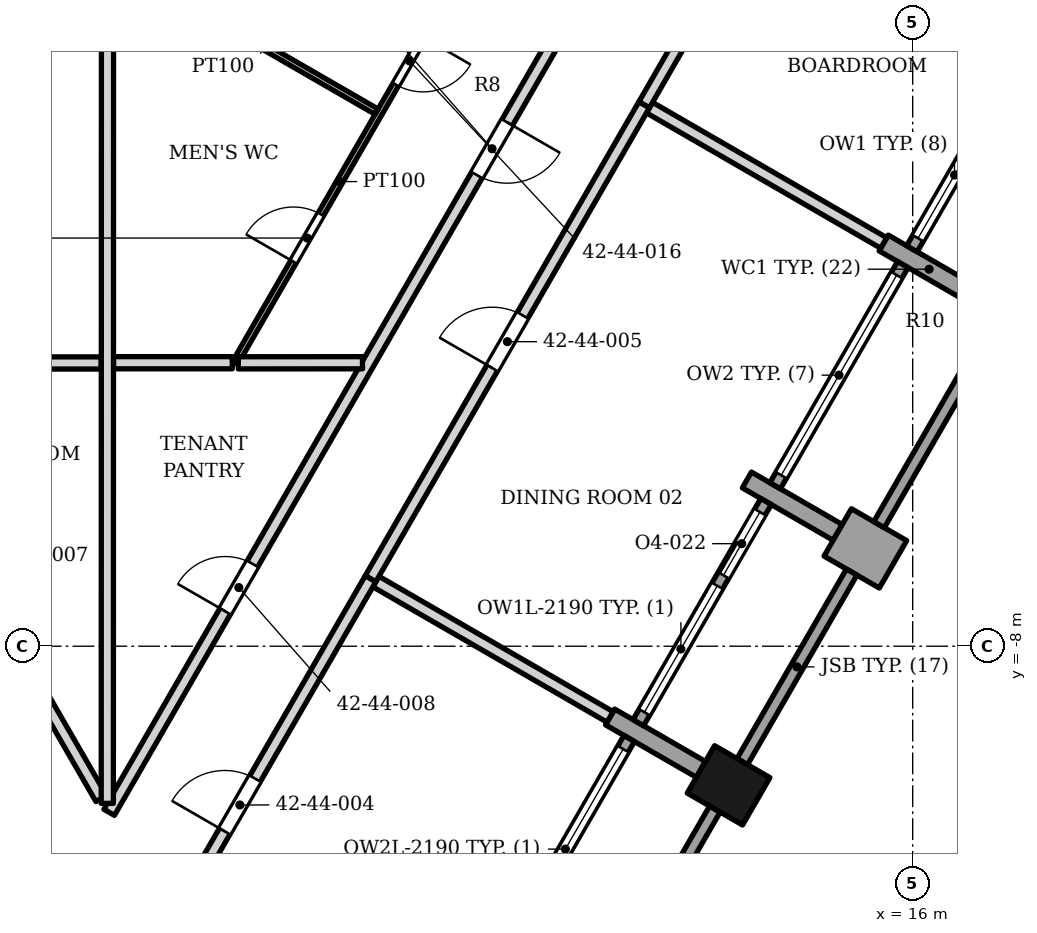
"""IFC4 building model, lengths in metres.
Left out: names, types, materials, properties, quantities, classifications, styles, units other than length and angle.
Written with IfcOpenShell. Run it as: python <this file> out.ifc"""

import sys

from ifc_helpers import new_model, si_unit, direction, frame, frame_2d, origin, origin_2d, place, context, subcontext, project, spatial, rectangle, extrude, element, fill, save


model = new_model("IFC4")
c1 = context("Model", 3, precision=1e-05, world=origin(), true_north=direction((0.0, 1.0)))
c2 = subcontext(c1, "Body", "Model", "MODEL_VIEW")
j1 = project(units=[si_unit("LENGTHUNIT", "METRE"), si_unit("PLANEANGLEUNIT", "RADIAN")], contexts=[c1])
p1 = place(None, origin())
s1 = spatial("IfcSite", under=j1, at=p1, CompositionType="ELEMENT")
p2 = place(p1, origin())
s2 = spatial("IfcBuilding", under=s1, at=p2, CompositionType="ELEMENT")
p3 = place(p2, frame((0.0, 0.0, 179.7)))
s3 = spatial("IfcBuildingStorey", under=s2, at=p3, CompositionType="ELEMENT", Elevation=179.7)
p4 = place(p3, frame((12.972, -10.288, 0.0), z_axis=(0.0, 0.0, 1.0), x_axis=(0.5, 0.866025403784, 0.0)))
e1 = element("IfcColumn", 1, at=p4, inside=s3, PredefinedType="COLUMN", context=c2, shape_type="SweptSolid", body=[
    extrude(rectangle(XDim=0.9, YDim=1.05, at=origin_2d()), origin(), (0.0, 0.0, 1.0), 3.9),
])
p5 = place(p3, frame((12.517, -10.026, 0.0), z_axis=(0.0, 0.0, 1.0), x_axis=(-0.866013532718, 0.500020560727, 0.0)))
e2 = element("IfcWall", 2, at=p5, inside=s3, PredefinedType="SOLIDWALL", context=c2, shape_type="SweptSolid", body=[
    extrude(rectangle(XDim=1.725, YDim=0.3, at=frame_2d((0.863, 0.0))), origin(), (0.0, 0.0, 1.0), 2.742),
])
p6 = place(p3, frame((15.676, -6.653, 0.0), z_axis=(0.0, 0.0, 1.0), x_axis=(-0.866030680601, 0.499990860175, 0.0)))
e3 = element("IfcWall", 3, at=p6, inside=s3, PredefinedType="SOLIDWALL", context=c2, shape_type="SweptSolid", body=[
    extrude(rectangle(XDim=1.05, YDim=0.9, at=frame_2d((0.525, 0.0))), origin(), (0.0, 0.0, 1.0), 3.0),
])
p7 = place(p3, frame((14.767, -6.128, 0.0), z_axis=(0.0, 0.0, 1.0), x_axis=(-0.866013532718, 0.500020560727, 0.0)))
e4 = element("IfcWall", 4, at=p7, inside=s3, PredefinedType="SOLIDWALL", context=c2, shape_type="SweptSolid", body=[
    extrude(rectangle(XDim=1.725, YDim=0.3, at=frame_2d((0.863, 0.0))), origin(), (0.0, 0.0, 1.0), 2.884),
])
p8 = place(p3, frame((15.523, -1.369, 0.0), z_axis=(0.0, 0.0, 1.0), x_axis=(0.866074815912, -0.499914405916, 0.0)))
e5 = element("IfcWall", 5, at=p8, inside=s3, PredefinedType="SOLIDWALL", context=c2, shape_type="SweptSolid", body=[
    extrude(rectangle(XDim=1.725, YDim=0.3, at=frame_2d((0.862, 0.0))), origin(), (0.0, 0.0, 1.0), 3.0),
])
p9 = place(p3, frame((10.947, -13.795, 0.0), z_axis=(0.0, 0.0, 1.0), x_axis=(0.499961193289, 0.866047807691, 0.0)))
e6 = element("IfcWall", 6, at=p9, inside=s3, PredefinedType="SOLIDWALL", context=c2, shape_type="SweptSolid", body=[
    extrude(rectangle(XDim=3.6, YDim=0.2, at=frame_2d((1.8, 0.0))), origin(), (0.0, 0.0, 1.0), 3.0),
])
p10 = place(p3, frame((9.238, -13.155, 0.0), z_axis=(0.0, 0.0, 1.0), x_axis=(0.500002543286, 0.866023935413, 0.0)))
e7 = element("IfcWall", 7, at=p10, inside=s3, PredefinedType="ELEMENTEDWALL", context=c2, shape_type="SweptSolid", body=[
    extrude(rectangle(XDim=4.2, YDim=0.2, at=frame_2d((2.1, 0.0))), origin(), (0.0, 0.0, 1.0), 2.742),
])
p11 = place(p10, frame((0.2, 0.0, 0.45)))
e8 = element("IfcOpeningElement", 8, at=p11, cuts=e7, PredefinedType="OPENING", context=c2, shape_type="SweptSolid", body=[
    extrude(rectangle(XDim=3.8, YDim=2.19, at=frame_2d((1.9, 1.095))), frame((0.0, 0.11, 0.0), z_axis=(0.0, -1.0, 0.0), x_axis=(1.0, 0.0, 0.0)), (0.0, 0.0, 1.0), 0.22),
])
p12 = place(p3, frame((13.197, -9.898, 0.0), z_axis=(0.0, 0.0, 1.0), x_axis=(0.499961193289, 0.866047807691, 0.0)))
e9 = element("IfcWall", 9, at=p12, inside=s3, PredefinedType="SOLIDWALL", context=c2, shape_type="SweptSolid", body=[
    extrude(rectangle(XDim=3.6, YDim=0.2, at=frame_2d((1.8, 0.0))), origin(), (0.0, 0.0, 1.0), 3.0),
])
p13 = place(p3, frame((11.488, -9.258, 0.0), z_axis=(0.0, 0.0, 1.0), x_axis=(0.500027713859, 0.866009402589, 0.0)))
e10 = element("IfcWall", 10, at=p13, inside=s3, PredefinedType="ELEMENTEDWALL", context=c2, shape_type="SweptSolid", body=[
    extrude(rectangle(XDim=4.2, YDim=0.2, at=frame_2d((2.1, 0.0))), origin(), (0.0, 0.0, 1.0), 2.742),
])
p14 = place(p13, frame((0.2, 0.0, 0.45)))
e11 = element("IfcOpeningElement", 11, at=p14, cuts=e10, PredefinedType="OPENING", context=c2, shape_type="SweptSolid", body=[
    extrude(rectangle(XDim=2.4, YDim=2.19, at=frame_2d((1.2, 1.095))), frame((0.0, 0.11, 0.0), z_axis=(0.0, -1.0, 0.0), x_axis=(1.0, 0.0, 0.0)), (0.0, 0.0, 1.0), 0.22),
])
p15 = place(p13, frame((2.8, 0.0, 0.0)))
e12 = element("IfcOpeningElement", 12, at=p15, cuts=e10, PredefinedType="OPENING", context=c2, shape_type="SweptSolid", body=[
    extrude(rectangle(XDim=1.2, YDim=2.64, at=frame_2d((0.6, 1.32))), frame((0.0, 0.11, 0.0), z_axis=(0.0, -1.0, 0.0), x_axis=(1.0, 0.0, 0.0)), (0.0, 0.0, 1.0), 0.22),
])
p16 = place(p3, frame((15.447, -6.001, 0.0), z_axis=(0.0, 0.0, 1.0), x_axis=(0.499961193289, 0.866047807691, 0.0)))
e13 = element("IfcWall", 13, at=p16, inside=s3, PredefinedType="SOLIDWALL", context=c2, shape_type="SweptSolid", body=[
    extrude(rectangle(XDim=3.6, YDim=0.2, at=frame_2d((1.8, 0.0))), origin(), (0.0, 0.0, 1.0), 3.0),
])
p17 = place(p3, frame((13.738, -5.361, 0.0), z_axis=(0.0, 0.0, 1.0), x_axis=(0.500002543286, 0.866023935413, 0.0)))
e14 = element("IfcWall", 14, at=p17, inside=s3, PredefinedType="ELEMENTEDWALL", context=c2, shape_type="SweptSolid", body=[
    extrude(rectangle(XDim=4.2, YDim=0.2, at=frame_2d((2.1, 0.0))), origin(), (0.0, 0.0, 1.0), 3.0),
])
p18 = place(p17, frame((0.2, 0.0, 0.45)))
e15 = element("IfcOpeningElement", 15, at=p18, cuts=e14, PredefinedType="OPENING", context=c2, shape_type="SweptSolid", body=[
    extrude(rectangle(XDim=3.8, YDim=2.25, at=frame_2d((1.9, 1.125))), frame((0.0, 0.11, 0.0), z_axis=(0.0, -1.0, 0.0), x_axis=(1.0, 0.0, 0.0)), (0.0, 0.0, 1.0), 0.22),
])
p19 = place(p3, frame((15.988, -1.464, 0.0), z_axis=(0.0, 0.0, 1.0), x_axis=(0.500027713859, 0.866009402589, 0.0)))
e16 = element("IfcWall", 16, at=p19, inside=s3, PredefinedType="ELEMENTEDWALL", context=c2, shape_type="SweptSolid", body=[
    extrude(rectangle(XDim=4.2, YDim=0.2, at=frame_2d((2.1, 0.0))), origin(), (0.0, 0.0, 1.0), 3.0),
])
p20 = place(p19, frame((0.2, 0.0, 0.45)))
e17 = element("IfcOpeningElement", 17, at=p20, cuts=e16, PredefinedType="OPENING", context=c2, shape_type="SweptSolid", body=[
    extrude(rectangle(XDim=2.4, YDim=2.25, at=frame_2d((1.2, 1.125))), frame((0.0, 0.11, 0.0), z_axis=(0.0, -1.0, 0.0), x_axis=(1.0, 0.0, 0.0)), (0.0, 0.0, 1.0), 0.22),
])
p21 = place(p19, frame((2.8, 0.0, 0.0)))
e18 = element("IfcOpeningElement", 18, at=p21, cuts=e16, PredefinedType="OPENING", context=c2, shape_type="SweptSolid", body=[
    extrude(rectangle(XDim=1.2, YDim=2.7, at=frame_2d((0.6, 1.35))), frame((0.0, 0.11, 0.0), z_axis=(0.0, -1.0, 0.0), x_axis=(1.0, 0.0, 0.0)), (0.0, 0.0, 1.0), 0.22),
])
p22 = place(p3, frame((2.785, -10.732, 0.0), z_axis=(0.0, 0.0, 1.0), x_axis=(0.499820110187, 0.866129238309, 0.0)))
e19 = element("IfcWall", 19, at=p22, inside=s3, PredefinedType="PARTITIONING", context=c2, shape_type="SweptSolid", body=[
    extrude(rectangle(XDim=16.664, YDim=0.2, at=frame_2d((8.332, 0.0))), origin(), (0.0, 0.0, 1.0), 2.742),
])
p23 = place(p22, frame((3.818, 0.0, 0.0)))
e20 = element("IfcOpeningElement", 20, at=p23, cuts=e19, PredefinedType="OPENING", context=c2, shape_type="SweptSolid", body=[
    extrude(rectangle(XDim=0.9, YDim=2.1, at=frame_2d((0.45, 1.05))), frame((0.0, 0.11, 0.0), z_axis=(0.0, -1.0, 0.0), x_axis=(1.0, 0.0, 0.0)), (0.0, 0.0, 1.0), 0.22),
])
p24 = place(p22, frame((12.1, 0.0, 0.0)))
e21 = element("IfcOpeningElement", 21, at=p24, cuts=e19, PredefinedType="OPENING", context=c2, shape_type="SweptSolid", body=[
    extrude(rectangle(XDim=1.0, YDim=2.1, at=frame_2d((0.5, 1.05))), frame((0.0, 0.11, 0.0), z_axis=(0.0, -1.0, 0.0), x_axis=(1.0, 0.0, 0.0)), (0.0, 0.0, 1.0), 0.22),
])
p25 = place(p3, frame((-0.245, -9.088, 0.0), z_axis=(0.0, 0.0, 1.0), x_axis=(0.500013981145, -0.866017331616, 0.0)))
e22 = element("IfcWall", 22, at=p25, inside=s3, PredefinedType="PARTITIONING", context=c2, shape_type="SweptSolid", body=[
    extrude(rectangle(XDim=4.398, YDim=0.2, at=frame_2d((2.199, 0.0))), origin(), (0.0, 0.0, 1.0), 2.742),
])
p26 = place(p25, frame((0.871, 0.0, 0.0)))
e23 = element("IfcOpeningElement", 23, at=p26, cuts=e22, PredefinedType="OPENING", context=c2, shape_type="SweptSolid", body=[
    extrude(rectangle(XDim=0.9, YDim=2.1, at=frame_2d((0.45, 1.05))), frame((0.0, 0.11, 0.0), z_axis=(0.0, -1.0, 0.0), x_axis=(1.0, 0.0, 0.0)), (0.0, 0.0, 1.0), 0.22),
])
p27 = place(p3, frame((7.17, -6.936, 0.0), z_axis=(0.0, 0.0, 1.0), x_axis=(0.865815424907, -0.500363517848, 0.0)))
e24 = element("IfcWall", 24, at=p27, inside=s3, PredefinedType="PARTITIONING", context=c2, shape_type="SweptSolid", body=[
    extrude(rectangle(XDim=4.45, YDim=0.2, at=frame_2d((2.225, 0.0))), origin(), (0.0, 0.0, 1.0), 2.742),
])
p28 = place(p3, frame((2.784, -14.333, 0.0), z_axis=(0.0, 0.0, 1.0), x_axis=(0.500204257301, 0.865907443656, 0.0)))
e25 = element("IfcWall", 25, at=p28, inside=s3, PredefinedType="PARTITIONING", context=c2, shape_type="SweptSolid", body=[
    extrude(rectangle(XDim=8.597, YDim=0.2, at=frame_2d((4.298, 0.0))), origin(), (0.0, 0.0, 1.0), 2.742),
])
p29 = place(p28, frame((3.799, 0.0, 0.0)))
e26 = element("IfcOpeningElement", 26, at=p29, cuts=e25, PredefinedType="OPENING", context=c2, shape_type="SweptSolid", body=[
    extrude(rectangle(XDim=1.0, YDim=2.4, at=frame_2d((0.5, 1.2))), frame((0.0, 0.11, 0.0), z_axis=(0.0, -1.0, 0.0), x_axis=(1.0, 0.0, 0.0)), (0.0, 0.0, 1.0), 0.22),
])
p30 = place(p3, frame((-1.48, -3.342, 0.0), z_axis=(0.0, 0.0, 1.0), x_axis=(0.499828066166, -0.866124647076, 0.0)))
e27 = element("IfcWall", 27, at=p30, inside=s3, PredefinedType="PARTITIONING", context=c2, shape_type="SweptSolid", body=[
    extrude(rectangle(XDim=8.271, YDim=0.2, at=frame_2d((4.136, 0.0))), origin(), (0.0, 0.0, 1.0), 2.742),
])
p31 = place(p30, frame((3.784, 0.0, 0.0)))
e28 = element("IfcOpeningElement", 28, at=p31, cuts=e27, PredefinedType="OPENING", context=c2, shape_type="SweptSolid", body=[
    extrude(rectangle(XDim=0.9, YDim=2.1, at=frame_2d((0.45, 1.05))), frame((0.0, 0.11, 0.0), z_axis=(0.0, -1.0, 0.0), x_axis=(1.0, 0.0, 0.0)), (0.0, 0.0, 1.0), 0.22),
])
p32 = place(p3, frame((-1.38, -3.342, 0.0), z_axis=(0.0, 0.0, 1.0), x_axis=(1.0, 0.0, 0.0)))
e29 = element("IfcWall", 29, at=p32, inside=s3, PredefinedType="PARTITIONING", context=c2, shape_type="SweptSolid", body=[
    extrude(rectangle(XDim=4.034, YDim=0.2, at=frame_2d((2.017, 0.0))), origin(), (0.0, 0.0, 1.0), 2.742),
])
p33 = place(p3, frame((2.856, -3.338, 0.0), z_axis=(0.0, 0.0, 1.0), x_axis=(1.0, 0.0, 0.0)))
e30 = element("IfcWall", 30, at=p33, inside=s3, PredefinedType="PARTITIONING", context=c2, shape_type="SweptSolid", body=[
    extrude(rectangle(XDim=1.954, YDim=0.2, at=frame_2d((0.977, 0.0))), origin(), (0.0, 0.0, 1.0), 2.742),
])
p34 = place(p3, frame((4.857, -3.34, 0.0), z_axis=(0.0, 0.0, 1.0), x_axis=(0.499969101261, 0.866043242445, 0.0)))
e31 = element("IfcWall", 31, at=p34, inside=s3, PredefinedType="PARTITIONING", context=c2, shape_type="SweptSolid", body=[
    extrude(rectangle(XDim=6.883, YDim=0.1, at=frame_2d((3.442, 0.0))), origin(), (0.0, 0.0, 1.0), 2.742),
])
p35 = place(p34, frame((1.919, 0.0, 0.0)))
e32 = element("IfcOpeningElement", 32, at=p35, cuts=e31, PredefinedType="OPENING", context=c2, shape_type="SweptSolid", body=[
    extrude(rectangle(XDim=0.9, YDim=2.1, at=frame_2d((0.45, 1.05))), frame((0.0, 0.06, 0.0), z_axis=(0.0, -1.0, 0.0), x_axis=(1.0, 0.0, 0.0)), (0.0, 0.0, 1.0), 0.12),
])
p36 = place(p34, frame((5.284, 0.0, 0.0)))
e33 = element("IfcOpeningElement", 33, at=p36, cuts=e31, PredefinedType="OPENING", context=c2, shape_type="SweptSolid", body=[
    extrude(rectangle(XDim=0.9, YDim=2.1, at=frame_2d((0.45, 1.05))), frame((0.0, 0.06, 0.0), z_axis=(0.0, -1.0, 0.0), x_axis=(1.0, 0.0, 0.0)), (0.0, 0.0, 1.0), 0.12),
])
p37 = place(p3, frame((4.909, -3.34, 0.0), z_axis=(0.0, 0.0, 1.0), x_axis=(0.99999974282, 0.000717188436, 0.0)))
e34 = element("IfcWall", 34, at=p37, inside=s3, PredefinedType="PARTITIONING", context=c2, shape_type="SweptSolid", body=[
    extrude(rectangle(XDim=2.042, YDim=0.2, at=frame_2d((1.021, 0.0))), origin(), (0.0, 0.0, 1.0), 3.73),
])
p38 = place(p3, frame((11.671, 0.858, 0.0), z_axis=(0.0, 0.0, 1.0), x_axis=(0.865862960607, -0.500281254345, 0.0)))
e35 = element("IfcWall", 35, at=p38, inside=s3, PredefinedType="PARTITIONING", context=c2, shape_type="SweptSolid", body=[
    extrude(rectangle(XDim=4.45, YDim=0.2, at=frame_2d((2.225, 0.0))), origin(), (0.0, 0.0, 1.0), 2.884),
])
p39 = place(p3, frame((7.085, -6.889, 0.0), z_axis=(0.0, 0.0, 1.0), x_axis=(0.499981539608, 0.866036061634, 0.0)))
e36 = element("IfcWall", 36, at=p39, inside=s3, PredefinedType="PARTITIONING", context=c2, shape_type="SweptSolid", body=[
    extrude(rectangle(XDim=9.0, YDim=0.2, at=frame_2d((4.5, 0.0))), origin(), (0.0, 0.0, 1.0), 2.742),
])
p40 = place(p39, frame((4.0, 0.0, 0.0)))
e37 = element("IfcOpeningElement", 37, at=p40, cuts=e36, PredefinedType="OPENING", context=c2, shape_type="SweptSolid", body=[
    extrude(rectangle(XDim=1.0, YDim=2.1, at=frame_2d((0.5, 1.05))), frame((0.0, 0.11, 0.0), z_axis=(0.0, -1.0, 0.0), x_axis=(1.0, 0.0, 0.0)), (0.0, 0.0, 1.0), 0.22),
])
p41 = place(p3, frame((2.754, -10.584, 0.0), z_axis=(0.0, 0.0, 1.0), x_axis=(0.00025119316, 0.999999968451, 0.0)))
e38 = element("IfcWall", 38, at=p41, inside=s3, PredefinedType="PARTITIONING", context=c2, shape_type="SweptSolid", body=[
    extrude(rectangle(XDim=12.635, YDim=0.2, at=frame_2d((6.317, 0.0))), origin(), (0.0, 0.0, 1.0), 3.73),
])
p42 = place(p3, frame((3.4, 2.975, 0.0), z_axis=(0.0, 0.0, 1.0), x_axis=(0.866040401994, -0.49997402144, 0.0)))
e39 = element("IfcWall", 39, at=p42, inside=s3, PredefinedType="PARTITIONING", context=c2, shape_type="SweptSolid", body=[
    extrude(rectangle(XDim=4.368, YDim=0.1, at=frame_2d((2.184, 0.0))), origin(), (0.0, 0.0, 1.0), 2.742),
])
p43 = place(p3, frame((11.585, 0.906, 0.0), z_axis=(0.0, 0.0, 1.0), x_axis=(0.499591387573, 0.866261187785, 0.0)))
e40 = element("IfcWall", 40, at=p43, inside=s3, PredefinedType="PARTITIONING", context=c2, shape_type="SweptSolid", body=[
    extrude(rectangle(XDim=3.225, YDim=0.2, at=frame_2d((1.613, 0.0))), origin(), (0.0, 0.0, 1.0), 3.73),
])
p44 = place(p11, origin())
e41 = element("IfcWindow", 41, at=p44, inside=s3, PartitioningType="SINGLE_PANEL", PredefinedType="WINDOW", context=c2, shape_type="SweptSolid", body=[
    extrude(rectangle(XDim=3.8, YDim=2.19, at=frame_2d((1.9, 1.095))), frame((0.0, 0.03, 0.0), z_axis=(0.0, -1.0, 0.0), x_axis=(1.0, 0.0, 0.0)), (0.0, 0.0, 1.0), 0.06),
])
fill(e8, e41)
p45 = place(p14, origin())
e42 = element("IfcWindow", 42, at=p45, inside=s3, PartitioningType="SINGLE_PANEL", PredefinedType="WINDOW", context=c2, shape_type="SweptSolid", body=[
    extrude(rectangle(XDim=2.4, YDim=2.19, at=frame_2d((1.2, 1.095))), frame((0.0, 0.03, 0.0), z_axis=(0.0, -1.0, 0.0), x_axis=(1.0, 0.0, 0.0)), (0.0, 0.0, 1.0), 0.06),
])
fill(e11, e42)
p46 = place(p15, origin())
e43 = element("IfcDoor", 43, at=p46, inside=s3, OperationType="SINGLE_SWING_LEFT", PredefinedType="DOOR", context=c2, shape_type="SweptSolid", body=[
    extrude(rectangle(XDim=1.2, YDim=2.64, at=frame_2d((0.6, 1.32))), frame((0.0, 0.025, 0.0), z_axis=(0.0, -1.0, 0.0), x_axis=(1.0, 0.0, 0.0)), (0.0, 0.0, 1.0), 0.05),
])
fill(e12, e43)
p47 = place(p18, origin())
e44 = element("IfcWindow", 44, at=p47, inside=s3, PartitioningType="SINGLE_PANEL", PredefinedType="WINDOW", context=c2, shape_type="SweptSolid", body=[
    extrude(rectangle(XDim=3.8, YDim=2.25, at=frame_2d((1.9, 1.125))), frame((0.0, 0.03, 0.0), z_axis=(0.0, -1.0, 0.0), x_axis=(1.0, 0.0, 0.0)), (0.0, 0.0, 1.0), 0.06),
])
fill(e15, e44)
p48 = place(p20, origin())
e45 = element("IfcWindow", 45, at=p48, inside=s3, PartitioningType="SINGLE_PANEL", PredefinedType="WINDOW", context=c2, shape_type="SweptSolid", body=[
    extrude(rectangle(XDim=2.4, YDim=2.25, at=frame_2d((1.2, 1.125))), frame((0.0, 0.03, 0.0), z_axis=(0.0, -1.0, 0.0), x_axis=(1.0, 0.0, 0.0)), (0.0, 0.0, 1.0), 0.06),
])
fill(e17, e45)
p49 = place(p29, origin())
e46 = element("IfcDoor", 46, at=p49, inside=s3, OperationType="SINGLE_SWING_LEFT", PredefinedType="DOOR", context=c2, shape_type="SweptSolid", body=[
    extrude(rectangle(XDim=1.0, YDim=2.4, at=frame_2d((0.5, 1.2))), frame((0.0, 0.025, 0.0), z_axis=(0.0, -1.0, 0.0), x_axis=(1.0, 0.0, 0.0)), (0.0, 0.0, 1.0), 0.05),
])
fill(e26, e46)
p50 = place(p40, origin())
e47 = element("IfcDoor", 47, at=p50, inside=s3, OperationType="SINGLE_SWING_LEFT", PredefinedType="DOOR", context=c2, shape_type="SweptSolid", body=[
    extrude(rectangle(XDim=1.0, YDim=2.1, at=frame_2d((0.5, 1.05))), frame((0.0, 0.025, 0.0), z_axis=(0.0, -1.0, 0.0), x_axis=(1.0, 0.0, 0.0)), (0.0, 0.0, 1.0), 0.05),
])
fill(e37, e47)
p51 = place(p23, origin())
e48 = element("IfcDoor", 48, at=p51, inside=s3, OperationType="SINGLE_SWING_LEFT", PredefinedType="DOOR", context=c2, shape_type="SweptSolid", body=[
    extrude(rectangle(XDim=0.9, YDim=2.1, at=frame_2d((0.45, 1.05))), frame((0.0, 0.025, 0.0), z_axis=(0.0, -1.0, 0.0), x_axis=(1.0, 0.0, 0.0)), (0.0, 0.0, 1.0), 0.05),
])
fill(e20, e48)
p52 = place(p24, origin())
e49 = element("IfcDoor", 49, at=p52, inside=s3, OperationType="SINGLE_SWING_RIGHT", PredefinedType="DOOR", context=c2, shape_type="SweptSolid", body=[
    extrude(rectangle(XDim=1.0, YDim=2.1, at=frame_2d((0.5, 1.05))), frame((0.0, 0.025, 0.0), z_axis=(0.0, -1.0, 0.0), x_axis=(1.0, 0.0, 0.0)), (0.0, 0.0, 1.0), 0.05),
])
fill(e21, e49)
p53 = place(p35, origin())
e50 = element("IfcDoor", 50, at=p53, inside=s3, OperationType="SINGLE_SWING_LEFT", PredefinedType="DOOR", context=c2, shape_type="SweptSolid", body=[
    extrude(rectangle(XDim=0.9, YDim=2.1, at=frame_2d((0.45, 1.05))), frame((0.0, 0.025, 0.0), z_axis=(0.0, -1.0, 0.0), x_axis=(1.0, 0.0, 0.0)), (0.0, 0.0, 1.0), 0.05),
])
fill(e32, e50)
p54 = place(p36, origin())
e51 = element("IfcDoor", 51, at=p54, inside=s3, OperationType="SINGLE_SWING_RIGHT", PredefinedType="DOOR", context=c2, shape_type="SweptSolid", body=[
    extrude(rectangle(XDim=0.9, YDim=2.1, at=frame_2d((0.45, 1.05))), frame((0.0, 0.025, 0.0), z_axis=(0.0, -1.0, 0.0), x_axis=(1.0, 0.0, 0.0)), (0.0, 0.0, 1.0), 0.05),
])
fill(e33, e51)
save(model, sys.argv[1])
